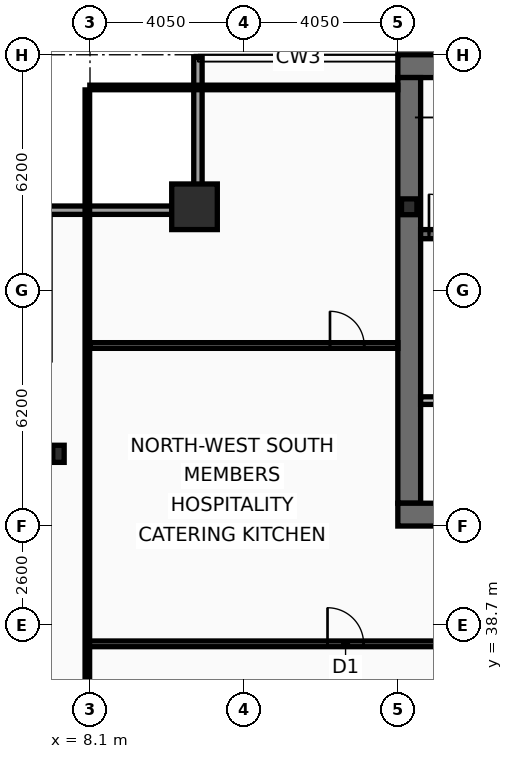
"""IFC4 building model, lengths in metres.
Left out: names, types, materials, properties, quantities, classifications, styles, units other than length and angle.
Written with IfcOpenShell. Run it as: python <this file> out.ifc"""

import sys

from ifc_helpers import new_model, si_unit, direction, frame, frame_2d, origin, origin_2d, place, context, subcontext, project, spatial, rectangle, hollow_rectangle, i_section, extrude, element, fill, save


model = new_model("IFC4")
c1 = context("Model", 3, precision=1e-05, world=origin(), true_north=direction((0.0, 1.0)))
c2 = subcontext(c1, "Body", "Model", "MODEL_VIEW")
j1 = project(units=[si_unit("LENGTHUNIT", "METRE"), si_unit("PLANEANGLEUNIT", "RADIAN")], contexts=[c1])
p1 = place(None, origin())
s1 = spatial("IfcSite", under=j1, at=p1, CompositionType="ELEMENT")
p2 = place(p1, origin())
s2 = spatial("IfcBuilding", under=s1, at=p2, CompositionType="ELEMENT")
p3 = place(p2, frame((0.0, 0.0, 217.4)))
s3 = spatial("IfcBuildingStorey", under=s2, at=p3, CompositionType="ELEMENT", Elevation=217.4)
p4 = place(p3, frame((16.2, 53.4, 0.0), z_axis=(0.0, 0.0, 1.0), x_axis=(1.0, 0.0, 0.0)))
e1 = element("IfcWall", 1, at=p4, inside=s3, PredefinedType="SHEAR", context=c2, shape_type="SweptSolid", body=[
    extrude(rectangle(XDim=40.5, YDim=0.6, at=frame_2d((20.25, 0.0))), origin(), (0.0, 0.0, 1.0), 3.44),
])
p5 = place(p3, frame((16.5, 41.9, 0.0), z_axis=(0.0, 0.0, 1.0), x_axis=(0.0, 1.0, 0.0)))
e2 = element("IfcWall", 2, at=p5, inside=s3, PredefinedType="SHEAR", context=c2, shape_type="SweptSolid", body=[
    extrude(rectangle(XDim=11.2, YDim=0.6, at=frame_2d((5.6, 0.0))), origin(), (0.0, 0.0, 1.0), 3.44),
])
p6 = place(p3, frame((18.65, 41.6, 0.0), z_axis=(0.0, 0.0, 1.0), x_axis=(-1.0, 0.0, 0.0)))
e3 = element("IfcWall", 3, at=p6, inside=s3, PredefinedType="SHEAR", context=c2, shape_type="SweptSolid", body=[
    extrude(rectangle(XDim=2.45, YDim=0.6, at=frame_2d((1.225, 0.0))), origin(), (0.0, 0.0, 1.0), 3.44),
])
p7 = place(p3, frame((16.8, 48.98, 0.0), z_axis=(0.0, 0.0, 1.0), x_axis=(1.0, 0.0, 0.0)))
e4 = element("IfcWall", 4, at=p7, inside=s3, PredefinedType="SHEAR", context=c2, shape_type="SweptSolid", body=[
    extrude(rectangle(XDim=7.42, YDim=0.24, at=frame_2d((3.71, 0.0))), origin(), (0.0, 0.0, 1.0), 3.44),
])
p8 = place(p7, frame((0.22, 0.0, 0.0)))
e5 = element("IfcOpeningElement", 5, at=p8, cuts=e4, PredefinedType="OPENING", context=c2, shape_type="SweptSolid", body=[
    extrude(rectangle(XDim=1.05, YDim=2.15, at=frame_2d((0.525, 1.075))), frame((0.0, 0.13, 0.0), z_axis=(0.0, -1.0, 0.0), x_axis=(1.0, 0.0, 0.0)), (0.0, 0.0, 1.0), 0.26),
])
p9 = place(p3, frame((10.85, 49.7, 0.0), z_axis=(0.0, 0.0, 1.0), x_axis=(1.0, 0.0, 0.0)))
e6 = element("IfcColumn", 6, at=p9, inside=s3, PredefinedType="COLUMN", context=c2, shape_type="SweptSolid", body=[
    extrude(hollow_rectangle(XDim=1.2, YDim=1.2, WallThickness=0.06, at=origin_2d()), origin(), (0.0, 0.0, 1.0), 3.6),
])
p10 = place(p3, frame((7.27, 43.2, 0.0), z_axis=(0.0, 0.0, 1.0), x_axis=(1.0, 0.0, 0.0)))
e7 = element("IfcColumn", 7, at=p10, inside=s3, PredefinedType="COLUMN", context=c2, shape_type="SweptSolid", body=[
    extrude(i_section(OverallWidth=0.3, OverallDepth=0.45, WebThickness=0.014, FlangeThickness=0.026, at=origin_2d()), origin(), (0.0, 0.0, 1.0), 3.6),
])
p11 = place(p3, frame((16.5, 49.7, 0.0), z_axis=(0.0, 0.0, 1.0), x_axis=(1.0, 0.0, 0.0)))
e8 = element("IfcColumn", 8, at=p11, inside=s3, PredefinedType="COLUMN", context=c2, shape_type="SweptSolid", body=[
    extrude(i_section(OverallWidth=0.406, OverallDepth=0.416, WebThickness=0.03, FlangeThickness=0.048, at=origin_2d()), origin(), (0.0, 0.0, 1.0), 3.6),
])
p12 = place(p3, frame((6.83, 49.61, 0.0), z_axis=(0.0, 0.0, 1.0), x_axis=(1.0, 0.0, 0.0)))
e9 = element("IfcWall", 9, at=p12, inside=s3, PredefinedType="SOLIDWALL", context=c2, shape_type="SweptSolid", body=[
    extrude(rectangle(XDim=4.22, YDim=0.22, at=frame_2d((2.11, 0.0))), origin(), (0.0, 0.0, 1.0), 2.83),
])
p13 = place(p3, frame((10.94, 49.72, 0.0), z_axis=(0.0, 0.0, 1.0), x_axis=(0.0, 1.0, 0.0)))
e10 = element("IfcWall", 10, at=p13, inside=s3, PredefinedType="SOLIDWALL", context=c2, shape_type="SweptSolid", body=[
    extrude(rectangle(XDim=3.91, YDim=0.22, at=frame_2d((1.955, 0.0))), origin(), (0.0, 0.0, 1.0), 2.83),
])
p14 = place(p3, frame((16.8, 44.6, 0.0), z_axis=(0.0, 0.0, 1.0), x_axis=(1.0, 0.0, 0.0)))
e11 = element("IfcWall", 11, at=p14, inside=s3, PredefinedType="PARTITIONING", context=c2, shape_type="SweptSolid", body=[
    extrude(rectangle(XDim=4.2, YDim=0.2, at=frame_2d((2.1, 0.0))), origin(), (0.0, 0.0, 1.0), 3.44),
])
p15 = place(p14, frame((1.25, 0.0, 0.0)))
e12 = element("IfcOpeningElement", 12, at=p15, cuts=e11, PredefinedType="OPENING", context=c2, shape_type="SweptSolid", body=[
    extrude(rectangle(XDim=1.05, YDim=2.15, at=frame_2d((0.525, 1.075))), frame((0.0, 0.11, 0.0), z_axis=(0.0, -1.0, 0.0), x_axis=(1.0, 0.0, 0.0)), (0.0, 0.0, 1.0), 0.22),
])
p16 = place(p3, frame((8.03, 38.2, 0.0), z_axis=(0.0, 0.0, 1.0), x_axis=(1.0, 0.0, 0.0)))
e13 = element("IfcWall", 13, at=p16, inside=s3, PredefinedType="PARTITIONING", context=c2, shape_type="SweptSolid", body=[
    extrude(rectangle(XDim=10.52, YDim=0.15, at=frame_2d((5.26, 0.0))), origin(), (0.0, 0.0, 1.0), 2.78),
])
p17 = place(p16, frame((6.32, 0.0, 0.0)))
e14 = element("IfcOpeningElement", 14, at=p17, cuts=e13, PredefinedType="OPENING", context=c2, shape_type="SweptSolid", body=[
    extrude(rectangle(XDim=0.95, YDim=2.05, at=frame_2d((0.475, 1.025))), frame((0.0, 0.085, 0.0), z_axis=(0.0, -1.0, 0.0), x_axis=(1.0, 0.0, 0.0)), (0.0, 0.0, 1.0), 0.17),
])
p18 = place(p3, frame((8.095, 46.05, 0.0), z_axis=(0.0, 0.0, 1.0), x_axis=(1.0, 0.0, 0.0)))
e15 = element("IfcWall", 15, at=p18, inside=s3, PredefinedType="PARTITIONING", context=c2, shape_type="SweptSolid", body=[
    extrude(rectangle(XDim=8.105, YDim=0.15, at=frame_2d((4.052, 0.0))), origin(), (0.0, 0.0, 1.0), 2.83),
])
p19 = place(p18, frame((6.32, 0.0, 0.0)))
e16 = element("IfcOpeningElement", 16, at=p19, cuts=e15, PredefinedType="OPENING", context=c2, shape_type="SweptSolid", body=[
    extrude(rectangle(XDim=0.9, YDim=2.05, at=frame_2d((0.45, 1.025))), frame((0.0, 0.085, 0.0), z_axis=(0.0, -1.0, 0.0), x_axis=(1.0, 0.0, 0.0)), (0.0, 0.0, 1.0), 0.17),
])
p20 = place(p3, frame((8.03, 10.665, 0.0), z_axis=(0.0, 0.0, 1.0), x_axis=(0.0, 1.0, 0.0)))
e17 = element("IfcWall", 17, at=p20, inside=s3, PredefinedType="PARTITIONING", context=c2, shape_type="SweptSolid", body=[
    extrude(rectangle(XDim=42.11, YDim=0.12, at=frame_2d((21.055, 0.0))), origin(), (0.0, 0.0, 1.0), 2.78),
])
p21 = place(p3, frame((8.095, 52.84, 0.0), z_axis=(0.0, 0.0, 1.0), x_axis=(1.0, 0.0, 0.0)))
e18 = element("IfcWall", 18, at=p21, inside=s3, PredefinedType="PARTITIONING", context=c2, shape_type="SweptSolid", body=[
    extrude(rectangle(XDim=8.105, YDim=0.12, at=frame_2d((4.052, 0.0))), origin(), (0.0, 0.0, 1.0), 3.44),
])
p22 = place(p8, origin())
e19 = element("IfcDoor", 19, at=p22, inside=s3, OperationType="SINGLE_SWING_LEFT", PredefinedType="DOOR", context=c2, shape_type="SweptSolid", body=[
    extrude(rectangle(XDim=1.05, YDim=2.15, at=frame_2d((0.525, 1.075))), frame((0.0, 0.025, 0.0), z_axis=(0.0, -1.0, 0.0), x_axis=(1.0, 0.0, 0.0)), (0.0, 0.0, 1.0), 0.05),
])
fill(e5, e19)
p23 = place(p17, origin())
e20 = element("IfcDoor", 20, at=p23, inside=s3, OperationType="SINGLE_SWING_LEFT", PredefinedType="DOOR", context=c2, shape_type="SweptSolid", body=[
    extrude(rectangle(XDim=0.95, YDim=2.05, at=frame_2d((0.475, 1.025))), frame((0.0, 0.025, 0.0), z_axis=(0.0, -1.0, 0.0), x_axis=(1.0, 0.0, 0.0)), (0.0, 0.0, 1.0), 0.05),
])
fill(e14, e20)
p24 = place(p19, origin())
e21 = element("IfcDoor", 21, at=p24, inside=s3, OperationType="SINGLE_SWING_LEFT", PredefinedType="DOOR", context=c2, shape_type="SweptSolid", body=[
    extrude(rectangle(XDim=0.9, YDim=2.05, at=frame_2d((0.45, 1.025))), frame((0.0, 0.025, 0.0), z_axis=(0.0, -1.0, 0.0), x_axis=(1.0, 0.0, 0.0)), (0.0, 0.0, 1.0), 0.05),
])
fill(e16, e21)
save(model, sys.argv[1])
